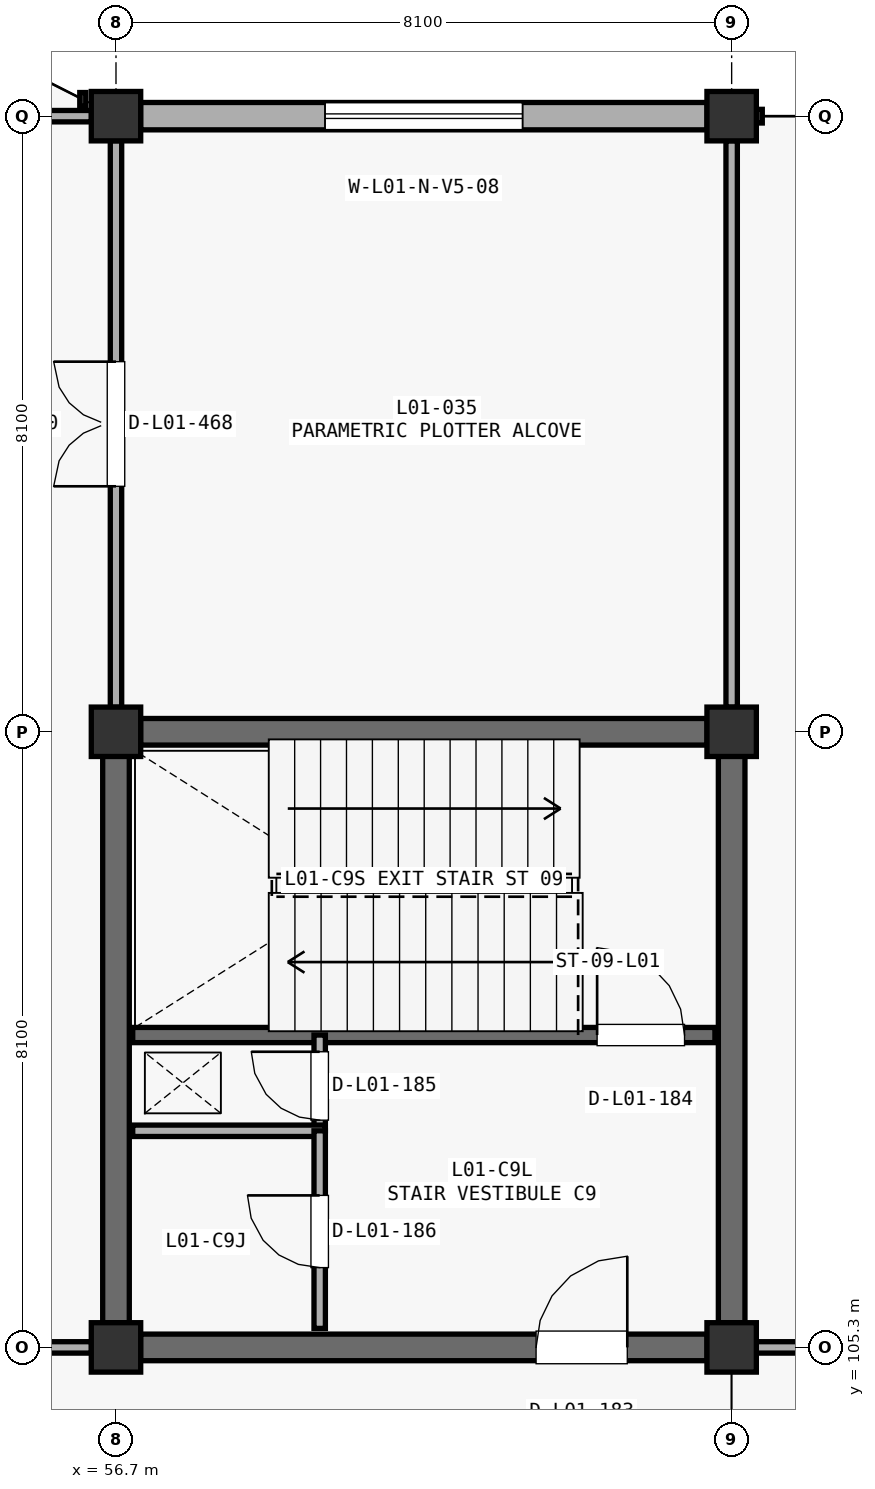
"""IFC4 building model, lengths in metres.
Left out: names, types, materials, properties, quantities, classifications, styles, units other than length and angle.
Written with IfcOpenShell. Run it as: python <this file> out.ifc"""

import sys

from ifc_helpers import new_model, si_unit, direction, frame, frame_2d, origin, origin_2d, place, context, subcontext, project, spatial, rectangle, extrude, element, fill, save


model = new_model("IFC4")
c1 = context("Model", 3, precision=1e-05, world=origin(), true_north=direction((0.0, 1.0)))
c2 = subcontext(c1, "Body", "Model", "MODEL_VIEW")
j1 = project(units=[si_unit("LENGTHUNIT", "METRE"), si_unit("PLANEANGLEUNIT", "RADIAN")], contexts=[c1])
p1 = place(None, origin())
s1 = spatial("IfcSite", under=j1, at=p1, CompositionType="ELEMENT")
p2 = place(p1, origin())
s2 = spatial("IfcBuilding", under=s1, at=p2, CompositionType="ELEMENT")
p3 = place(p2, frame((0.0, 0.0, 5.1)))
s3 = spatial("IfcBuildingStorey", under=s2, at=p3, CompositionType="ELEMENT", Elevation=5.1)
for number, where, z_axis, x_axis in (
    (1, (56.7, 105.3, 0.0), (0.0, 0.0, 1.0), (1.0, 0.0, 0.0)),
    (2, (56.7, 113.4, 0.0), (0.0, 0.0, 1.0), (1.0, 0.0, 0.0)),
    (3, (56.7, 121.5, 0.0), (0.0, 0.0, 1.0), (1.0, 0.0, 0.0)),
    (4, (64.8, 105.3, 0.0), (0.0, 0.0, 1.0), (1.0, 0.0, 0.0)),
    (5, (64.8, 113.4, 0.0), (0.0, 0.0, 1.0), (1.0, 0.0, 0.0)),
    (6, (64.8, 121.5, 0.0), (0.0, 0.0, 1.0), (1.0, 0.0, 0.0)),
):
    element("IfcColumn", number, at=place(p3, frame(where, z_axis=z_axis, x_axis=x_axis)), inside=s3, PredefinedType="COLUMN", context=c2, shape_type="SweptSolid", body=[
        extrude(rectangle(XDim=0.65, YDim=0.65, at=origin_2d()), origin(), (0.0, 0.0, 1.0), 4.59),
    ])
p4 = place(p3, frame((57.023, 121.5, 0.0), z_axis=(0.0, 0.0, 1.0), x_axis=(1.0, 0.0, 0.0)))
e7 = element("IfcWall", 7, at=p4, inside=s3, PredefinedType="STANDARD", context=c2, shape_type="SweptSolid", body=[
    extrude(rectangle(XDim=7.454, YDim=0.36, at=frame_2d((3.727, 0.0))), origin(), (0.0, 0.0, 1.0), 3.302),
])
p5 = place(p4, frame((2.427, 0.0, 0.85)))
e8 = element("IfcOpeningElement", 8, at=p5, cuts=e7, PredefinedType="OPENING", context=c2, shape_type="SweptSolid", body=[
    extrude(rectangle(XDim=2.6, YDim=1.6, at=frame_2d((1.3, 0.8))), frame((0.0, 0.19, 0.0), z_axis=(0.0, -1.0, 0.0), x_axis=(1.0, 0.0, 0.0)), (0.0, 0.0, 1.0), 0.38),
])
p6 = place(p3, frame((57.023, 113.4, 0.0), z_axis=(0.0, 0.0, 1.0), x_axis=(1.0, 0.0, 0.0)))
e9 = element("IfcWall", 9, at=p6, inside=s3, PredefinedType="SHEAR", context=c2, shape_type="SweptSolid", body=[
    extrude(rectangle(XDim=7.454, YDim=0.35, at=frame_2d((3.727, 0.0))), origin(), (0.0, 0.0, 1.0), 4.252),
])
for number, where, z_axis, x_axis in (
    (10, (56.7, 105.623, 0.0), (0.0, 0.0, 1.0), (0.0, 1.0, 0.0)),
    (11, (64.8, 105.623, 0.0), (0.0, 0.0, 1.0), (0.0, 1.0, 0.0)),
):
    element("IfcWall", number, at=place(p3, frame(where, z_axis=z_axis, x_axis=x_axis)), inside=s3, PredefinedType="SHEAR", context=c2, shape_type="SweptSolid", body=[
        extrude(rectangle(XDim=7.454, YDim=0.35, at=frame_2d((3.727, 0.0))), origin(), (0.0, 0.0, 1.0), 4.252),
    ])
p7 = place(p3, frame((57.023, 105.3, 0.0), z_axis=(0.0, 0.0, 1.0), x_axis=(1.0, 0.0, 0.0)))
e12 = element("IfcWall", 12, at=p7, inside=s3, PredefinedType="SHEAR", context=c2, shape_type="SweptSolid", body=[
    extrude(rectangle(XDim=7.454, YDim=0.35, at=frame_2d((3.727, 0.0))), origin(), (0.0, 0.0, 1.0), 4.252),
])
p8 = place(p7, frame((5.204, 0.0, 0.0)))
e13 = element("IfcOpeningElement", 13, at=p8, cuts=e12, PredefinedType="OPENING", context=c2, shape_type="SweptSolid", body=[
    extrude(rectangle(XDim=1.2, YDim=2.2, at=frame_2d((0.6, 1.1))), frame((0.0, 0.185, 0.0), z_axis=(0.0, -1.0, 0.0), x_axis=(1.0, 0.0, 0.0)), (0.0, 0.0, 1.0), 0.37),
])
p9 = place(p3, frame((56.92, 109.41, 0.0), z_axis=(0.0, 0.0, 1.0), x_axis=(1.0, 0.0, 0.0)))
e14 = element("IfcWall", 14, at=p9, inside=s3, PredefinedType="SHEAR", context=c2, shape_type="SweptSolid", body=[
    extrude(rectangle(XDim=7.66, YDim=0.2, at=frame_2d((3.83, 0.0))), origin(), (0.0, 0.0, 1.0), 4.252),
])
p10 = place(p9, frame((6.11, 0.0, 0.0)))
e15 = element("IfcOpeningElement", 15, at=p10, cuts=e14, PredefinedType="OPENING", context=c2, shape_type="SweptSolid", body=[
    extrude(rectangle(XDim=1.15, YDim=2.2, at=frame_2d((0.575, 1.1))), frame((0.0, 0.11, 0.0), z_axis=(0.0, -1.0, 0.0), x_axis=(1.0, 0.0, 0.0)), (0.0, 0.0, 1.0), 0.22),
])
p11 = place(p3, frame((59.38, 108.15, 0.0), z_axis=(0.0, 0.0, 1.0), x_axis=(0.0, 1.0, 0.0)))
e16 = element("IfcWall", 16, at=p11, inside=s3, PredefinedType="PARTITIONING", context=c2, shape_type="SweptSolid", body=[
    extrude(rectangle(XDim=1.26, YDim=0.15, at=frame_2d((0.63, 0.0))), origin(), (0.0, 0.0, 1.0), 4.252),
])
p12 = place(p11, frame((0.14, 0.0, 0.0)))
e17 = element("IfcOpeningElement", 17, at=p12, cuts=e16, PredefinedType="OPENING", context=c2, shape_type="SweptSolid", body=[
    extrude(rectangle(XDim=0.9, YDim=2.15, at=frame_2d((0.45, 1.075))), frame((0.0, 0.085, 0.0), z_axis=(0.0, -1.0, 0.0), x_axis=(1.0, 0.0, 0.0)), (0.0, 0.0, 1.0), 0.17),
])
p13 = place(p3, frame((56.92, 108.15, 0.0), z_axis=(0.0, 0.0, 1.0), x_axis=(1.0, 0.0, 0.0)))
e18 = element("IfcWall", 18, at=p13, inside=s3, PredefinedType="PARTITIONING", context=c2, shape_type="SweptSolid", body=[
    extrude(rectangle(XDim=2.53, YDim=0.15, at=frame_2d((1.265, 0.0))), origin(), (0.0, 0.0, 1.0), 4.252),
])
p14 = place(p3, frame((59.38, 105.55, 0.0), z_axis=(0.0, 0.0, 1.0), x_axis=(0.0, 1.0, 0.0)))
e19 = element("IfcWall", 19, at=p14, inside=s3, PredefinedType="PARTITIONING", context=c2, shape_type="SweptSolid", body=[
    extrude(rectangle(XDim=2.6, YDim=0.15, at=frame_2d((1.3, 0.0))), origin(), (0.0, 0.0, 1.0), 4.252),
])
p15 = place(p14, frame((0.8, 0.0, 0.0)))
e20 = element("IfcOpeningElement", 20, at=p15, cuts=e19, PredefinedType="OPENING", context=c2, shape_type="SweptSolid", body=[
    extrude(rectangle(XDim=0.95, YDim=2.15, at=frame_2d((0.475, 1.075))), frame((0.0, 0.085, 0.0), z_axis=(0.0, -1.0, 0.0), x_axis=(1.0, 0.0, 0.0)), (0.0, 0.0, 1.0), 0.17),
])
p16 = place(p3, frame((48.923, 105.3, 0.0), z_axis=(0.0, 0.0, 1.0), x_axis=(1.0, 0.0, 0.0)))
e21 = element("IfcWall", 21, at=p16, inside=s3, PredefinedType="PARTITIONING", context=c2, shape_type="SweptSolid", body=[
    extrude(rectangle(XDim=7.454, YDim=0.15, at=frame_2d((3.727, 0.0))), origin(), (0.0, 0.0, 1.0), 3.602),
])
p17 = place(p3, frame((56.7, 113.723, 0.0), z_axis=(0.0, 0.0, 1.0), x_axis=(0.0, 1.0, 0.0)))
e22 = element("IfcWall", 22, at=p17, inside=s3, PredefinedType="PARTITIONING", context=c2, shape_type="SweptSolid", body=[
    extrude(rectangle(XDim=7.454, YDim=0.15, at=frame_2d((3.727, 0.0))), origin(), (0.0, 0.0, 1.0), 3.502),
])
p18 = place(p17, frame((2.907, 0.0, 0.0)))
e23 = element("IfcOpeningElement", 23, at=p18, cuts=e22, PredefinedType="OPENING", context=c2, shape_type="SweptSolid", body=[
    extrude(rectangle(XDim=1.64, YDim=2.25, at=frame_2d((0.82, 1.125))), frame((0.0, 0.085, 0.0), z_axis=(0.0, -1.0, 0.0), x_axis=(1.0, 0.0, 0.0)), (0.0, 0.0, 1.0), 0.17),
])
p19 = place(p3, frame((48.923, 121.5, 0.0), z_axis=(0.0, 0.0, 1.0), x_axis=(1.0, 0.0, 0.0)))
e24 = element("IfcWall", 24, at=p19, inside=s3, PredefinedType="PARTITIONING", context=c2, shape_type="SweptSolid", body=[
    extrude(rectangle(XDim=7.454, YDim=0.15, at=frame_2d((3.727, 0.0))), origin(), (0.0, 0.0, 1.0), 3.837),
])
p20 = place(p3, frame((65.123, 105.3, 0.0), z_axis=(0.0, 0.0, 1.0), x_axis=(1.0, 0.0, 0.0)))
e25 = element("IfcWall", 25, at=p20, inside=s3, PredefinedType="PARTITIONING", context=c2, shape_type="SweptSolid", body=[
    extrude(rectangle(XDim=7.454, YDim=0.15, at=frame_2d((3.727, 0.0))), origin(), (0.0, 0.0, 1.0), 3.402),
])
p21 = place(p20, frame((3.027, 0.0, 0.0)))
e26 = element("IfcOpeningElement", 26, at=p21, cuts=e25, PredefinedType="OPENING", context=c2, shape_type="SweptSolid", body=[
    extrude(rectangle(XDim=1.4, YDim=2.2, at=frame_2d((0.7, 1.1))), frame((0.0, 0.085, 0.0), z_axis=(0.0, -1.0, 0.0), x_axis=(1.0, 0.0, 0.0)), (0.0, 0.0, 1.0), 0.17),
])
p22 = place(p3, frame((64.8, 113.723, 0.0), z_axis=(0.0, 0.0, 1.0), x_axis=(0.0, 1.0, 0.0)))
e27 = element("IfcWall", 27, at=p22, inside=s3, PredefinedType="PARTITIONING", context=c2, shape_type="SweptSolid", body=[
    extrude(rectangle(XDim=7.454, YDim=0.15, at=frame_2d((3.727, 0.0))), origin(), (0.0, 0.0, 1.0), 3.652),
])
p23 = place(p5, origin())
e28 = element("IfcWindow", 28, at=p23, inside=s3, PartitioningType="SINGLE_PANEL", PredefinedType="WINDOW", context=c2, shape_type="SweptSolid", body=[
    extrude(rectangle(XDim=2.6, YDim=1.6, at=frame_2d((1.3, 0.8))), frame((0.0, 0.03, 0.0), z_axis=(0.0, -1.0, 0.0), x_axis=(1.0, 0.0, 0.0)), (0.0, 0.0, 1.0), 0.06),
])
fill(e8, e28)
p24 = place(p8, origin())
e29 = element("IfcDoor", 29, at=p24, inside=s3, OperationType="SINGLE_SWING_RIGHT", PredefinedType="DOOR", context=c2, shape_type="SweptSolid", body=[
    extrude(rectangle(XDim=1.2, YDim=2.2, at=frame_2d((0.6, 1.1))), frame((0.0, 0.025, 0.0), z_axis=(0.0, -1.0, 0.0), x_axis=(1.0, 0.0, 0.0)), (0.0, 0.0, 1.0), 0.05),
])
fill(e13, e29)
p25 = place(p10, origin())
e30 = element("IfcDoor", 30, at=p25, inside=s3, OperationType="SINGLE_SWING_LEFT", PredefinedType="DOOR", context=c2, shape_type="SweptSolid", body=[
    extrude(rectangle(XDim=1.15, YDim=2.2, at=frame_2d((0.575, 1.1))), frame((0.0, 0.025, 0.0), z_axis=(0.0, -1.0, 0.0), x_axis=(1.0, 0.0, 0.0)), (0.0, 0.0, 1.0), 0.05),
])
fill(e15, e30)
p26 = place(p12, origin())
e31 = element("IfcDoor", 31, at=p26, inside=s3, OperationType="SINGLE_SWING_RIGHT", PredefinedType="DOOR", context=c2, shape_type="SweptSolid", body=[
    extrude(rectangle(XDim=0.9, YDim=2.15, at=frame_2d((0.45, 1.075))), frame((0.0, 0.025, 0.0), z_axis=(0.0, -1.0, 0.0), x_axis=(1.0, 0.0, 0.0)), (0.0, 0.0, 1.0), 0.05),
])
fill(e17, e31)
p27 = place(p15, origin())
e32 = element("IfcDoor", 32, at=p27, inside=s3, OperationType="SINGLE_SWING_RIGHT", PredefinedType="DOOR", context=c2, shape_type="SweptSolid", body=[
    extrude(rectangle(XDim=0.95, YDim=2.15, at=frame_2d((0.475, 1.075))), frame((0.0, 0.025, 0.0), z_axis=(0.0, -1.0, 0.0), x_axis=(1.0, 0.0, 0.0)), (0.0, 0.0, 1.0), 0.05),
])
fill(e20, e32)
p28 = place(p18, origin())
e33 = element("IfcDoor", 33, at=p28, inside=s3, OperationType="DOUBLE_SWING_LEFT", PredefinedType="DOOR", context=c2, shape_type="SweptSolid", body=[
    extrude(rectangle(XDim=1.64, YDim=2.25, at=frame_2d((0.82, 1.125))), frame((0.0, 0.025, 0.0), z_axis=(0.0, -1.0, 0.0), x_axis=(1.0, 0.0, 0.0)), (0.0, 0.0, 1.0), 0.05),
])
fill(e23, e33)
save(model, sys.argv[1])
